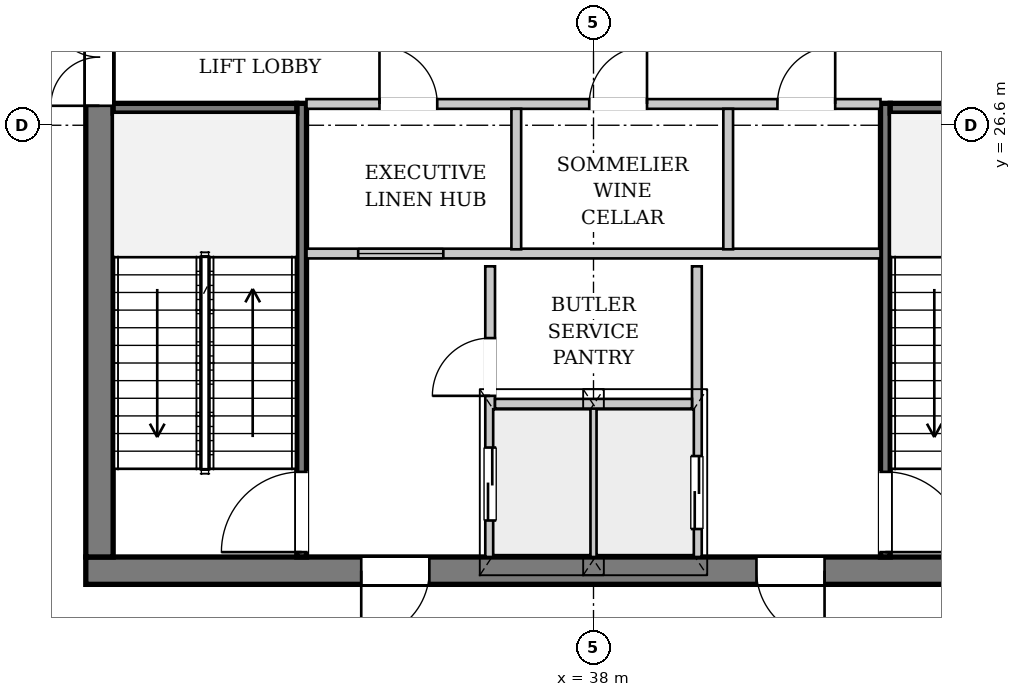
"""IFC4 building model, lengths in metres.
Left out: names, types, materials, properties, quantities, classifications, styles, units other than length and angle.
Written with IfcOpenShell. Run it as: python <this file> out.ifc"""

import sys

from ifc_helpers import new_model, si_unit, direction, frame, frame_2d, origin, place, context, subcontext, project, spatial, rectangle, extrude, source, transform, mapped, element, fill, save


model = new_model("IFC4")
c1 = context("Model", 3, precision=1e-05, world=origin(), true_north=direction((0.0, 1.0)))
c2 = subcontext(c1, "Body", "Model", "MODEL_VIEW")
j1 = project(units=[si_unit("LENGTHUNIT", "METRE"), si_unit("PLANEANGLEUNIT", "RADIAN")], contexts=[c1])
p1 = place(None, origin())
s1 = spatial("IfcSite", under=j1, at=p1, CompositionType="ELEMENT")
p2 = place(p1, origin())
s2 = spatial("IfcBuilding", under=s1, at=p2, CompositionType="ELEMENT")
p3 = place(p2, frame((0.0, 0.0, 286.1)))
s3 = spatial("IfcBuildingStorey", under=s2, at=p3, CompositionType="ELEMENT", Elevation=286.1)
p4 = place(p3, frame((30.61, 12.974, 0.0), z_axis=(0.0, 0.0, 1.0), x_axis=(-0.818470582771, 0.57454843585, 0.0)))
e1 = element("IfcWall", 1, at=p4, inside=s3, PredefinedType="SOLIDWALL", context=c2, shape_type="SweptSolid", body=[
    extrude(rectangle(XDim=17.145, YDim=0.32, at=frame_2d((8.573, 0.0))), origin(), (0.0, 0.0, 1.0), 3.662),
])
p5 = place(p4, frame((4.737, 0.0, 0.0)))
e2 = element("IfcOpeningElement", 2, at=p5, cuts=e1, PredefinedType="OPENING", context=c2, shape_type="SweptSolid", body=[
    extrude(rectangle(XDim=1.5, YDim=2.3, at=frame_2d((0.75, 1.15))), frame((0.0, 0.17, 0.0), z_axis=(0.0, -1.0, 0.0), x_axis=(1.0, 0.0, 0.0)), (0.0, 0.0, 1.0), 0.34),
])
p6 = place(p4, frame((11.388, 0.0, 0.65)))
e3 = element("IfcOpeningElement", 3, at=p6, cuts=e1, PredefinedType="OPENING", context=c2, shape_type="SweptSolid", body=[
    extrude(rectangle(XDim=2.6, YDim=2.35, at=frame_2d((1.3, 1.175))), frame((0.0, 0.17, 0.0), z_axis=(0.0, -1.0, 0.0), x_axis=(1.0, 0.0, 0.0)), (0.0, 0.0, 1.0), 0.34),
])
p7 = place(p3, frame((46.35, 19.275, 0.0), z_axis=(0.0, 0.0, 1.0), x_axis=(-1.0, 0.0, 0.0)))
e4 = element("IfcWall", 4, at=p7, inside=s3, PredefinedType="SHEAR", context=c2, shape_type="SweptSolid", body=[
    extrude(rectangle(XDim=16.7, YDim=0.45, at=frame_2d((8.35, 0.0))), origin(), (0.0, 0.0, 1.0), 4.12),
])
p8 = place(p7, frame((4.55, 0.0, 0.0)))
e5 = element("IfcOpeningElement", 5, at=p8, cuts=e4, PredefinedType="OPENING", context=c2, shape_type="SweptSolid", body=[
    extrude(rectangle(XDim=1.12, YDim=2.25, at=frame_2d((0.56, 1.125))), frame((0.0, 0.235, 0.0), z_axis=(0.0, -1.0, 0.0), x_axis=(1.0, 0.0, 0.0)), (0.0, 0.0, 1.0), 0.47),
])
p9 = place(p7, frame((11.05, 0.0, 0.0)))
e6 = element("IfcOpeningElement", 6, at=p9, cuts=e4, PredefinedType="OPENING", context=c2, shape_type="SweptSolid", body=[
    extrude(rectangle(XDim=1.12, YDim=2.25, at=frame_2d((0.56, 1.125))), frame((0.0, 0.235, 0.0), z_axis=(0.0, -1.0, 0.0), x_axis=(1.0, 0.0, 0.0)), (0.0, 0.0, 1.0), 0.47),
])
p10 = place(p3, frame((29.875, 19.5, 0.0), z_axis=(0.0, 0.0, 1.0), x_axis=(0.0, 1.0, 0.0)))
e7 = element("IfcWall", 7, at=p10, inside=s3, PredefinedType="SHEAR", context=c2, shape_type="SweptSolid", body=[
    extrude(rectangle(XDim=14.2, YDim=0.45, at=frame_2d((7.1, 0.0))), origin(), (0.0, 0.0, 1.0), 4.12),
])
p11 = place(p10, frame((7.42, 0.0, 0.0)))
e8 = element("IfcOpeningElement", 8, at=p11, cuts=e7, PredefinedType="OPENING", context=c2, shape_type="SweptSolid", body=[
    extrude(rectangle(XDim=1.6, YDim=2.2, at=frame_2d((0.8, 1.1))), frame((0.0, 0.235, 0.0), z_axis=(0.0, -1.0, 0.0), x_axis=(1.0, 0.0, 0.0)), (0.0, 0.0, 1.0), 0.47),
])
p12 = place(p3, frame((33.2, 19.5, 0.0), z_axis=(0.0, 0.0, 1.0), x_axis=(0.0, 1.0, 0.0)))
e9 = element("IfcWall", 9, at=p12, inside=s3, PredefinedType="PARTITIONING", context=c2, shape_type="SweptSolid", body=[
    extrude(rectangle(XDim=7.46, YDim=0.16, at=frame_2d((3.73, 0.0))), origin(), (0.0, 0.0, 1.0), 4.12),
])
p13 = place(p12, frame((0.08, 0.0, 0.0)))
e10 = element("IfcOpeningElement", 10, at=p13, cuts=e9, PredefinedType="OPENING", context=c2, shape_type="SweptSolid", body=[
    extrude(rectangle(XDim=1.32, YDim=2.2, at=frame_2d((0.66, 1.1))), frame((0.0, 0.09, 0.0), z_axis=(0.0, -1.0, 0.0), x_axis=(1.0, 0.0, 0.0)), (0.0, 0.0, 1.0), 0.18),
])
p14 = place(p3, frame((30.1, 26.88, 0.0), z_axis=(0.0, 0.0, 1.0), x_axis=(1.0, 0.0, 0.0)))
e11 = element("IfcWall", 11, at=p14, inside=s3, PredefinedType="PARTITIONING", context=c2, shape_type="SweptSolid", body=[
    extrude(rectangle(XDim=3.02, YDim=0.16, at=frame_2d((1.51, 0.0))), origin(), (0.0, 0.0, 1.0), 4.12),
])
p15 = place(p3, frame((42.8, 26.96, 0.0), z_axis=(0.0, 0.0, 1.0), x_axis=(0.0, -1.0, 0.0)))
e12 = element("IfcWall", 12, at=p15, inside=s3, PredefinedType="PARTITIONING", context=c2, shape_type="SweptSolid", body=[
    extrude(rectangle(XDim=7.46, YDim=0.16, at=frame_2d((3.73, 0.0))), origin(), (0.0, 0.0, 1.0), 4.12),
])
p16 = place(p15, frame((6.06, 0.0, 0.0)))
e13 = element("IfcOpeningElement", 13, at=p16, cuts=e12, PredefinedType="OPENING", context=c2, shape_type="SweptSolid", body=[
    extrude(rectangle(XDim=1.32, YDim=2.2, at=frame_2d((0.66, 1.1))), frame((0.0, 0.09, 0.0), z_axis=(0.0, -1.0, 0.0), x_axis=(1.0, 0.0, 0.0)), (0.0, 0.0, 1.0), 0.18),
])
p17 = place(p3, frame((42.88, 26.88, 0.0), z_axis=(0.0, 0.0, 1.0), x_axis=(1.0, 0.0, 0.0)))
e14 = element("IfcWall", 14, at=p17, inside=s3, PredefinedType="PARTITIONING", context=c2, shape_type="SweptSolid", body=[
    extrude(rectangle(XDim=3.02, YDim=0.16, at=frame_2d((1.51, 0.0))), origin(), (0.0, 0.0, 1.0), 4.12),
])
p18 = place(p3, frame((36.3, 19.5, 0.0), z_axis=(0.0, 0.0, 1.0), x_axis=(0.0, 1.0, 0.0)))
e15 = element("IfcWall", 15, at=p18, inside=s3, PredefinedType="PARTITIONING", context=c2, shape_type="SweptSolid", body=[
    extrude(rectangle(XDim=4.78, YDim=0.16, at=frame_2d((2.39, 0.0))), origin(), (0.0, 0.0, 1.0), 4.12),
])
p19 = place(p18, frame((0.6, 0.0, 0.0)))
e16 = element("IfcOpeningElement", 16, at=p19, cuts=e15, PredefinedType="OPENING", context=c2, shape_type="SweptSolid", body=[
    extrude(rectangle(XDim=1.2, YDim=2.2, at=frame_2d((0.6, 1.1))), frame((0.0, 0.09, 0.0), z_axis=(0.0, -1.0, 0.0), x_axis=(1.0, 0.0, 0.0)), (0.0, 0.0, 1.0), 0.18),
])
p20 = place(p18, frame((2.65, 0.0, 0.0)))
e17 = element("IfcOpeningElement", 17, at=p20, cuts=e15, PredefinedType="OPENING", context=c2, shape_type="SweptSolid", body=[
    extrude(rectangle(XDim=0.95, YDim=2.1, at=frame_2d((0.475, 1.05))), frame((0.0, 0.09, 0.0), z_axis=(0.0, -1.0, 0.0), x_axis=(1.0, 0.0, 0.0)), (0.0, 0.0, 1.0), 0.18),
])
p21 = place(p3, frame((39.7, 24.28, 0.0), z_axis=(0.0, 0.0, 1.0), x_axis=(0.0, -1.0, 0.0)))
e18 = element("IfcWall", 18, at=p21, inside=s3, PredefinedType="PARTITIONING", context=c2, shape_type="SweptSolid", body=[
    extrude(rectangle(XDim=4.78, YDim=0.16, at=frame_2d((2.39, 0.0))), origin(), (0.0, 0.0, 1.0), 4.12),
])
p22 = place(p21, frame((3.12, 0.0, 0.0)))
e19 = element("IfcOpeningElement", 19, at=p22, cuts=e18, PredefinedType="OPENING", context=c2, shape_type="SweptSolid", body=[
    extrude(rectangle(XDim=1.2, YDim=2.2, at=frame_2d((0.6, 1.1))), frame((0.0, 0.09, 0.0), z_axis=(0.0, -1.0, 0.0), x_axis=(1.0, 0.0, 0.0)), (0.0, 0.0, 1.0), 0.18),
])
p23 = place(p3, frame((38.0, 19.5, 0.0), z_axis=(0.0, 0.0, 1.0), x_axis=(0.0, 1.0, 0.0)))
e20 = element("IfcWall", 20, at=p23, inside=s3, PredefinedType="PARTITIONING", context=c2, shape_type="SweptSolid", body=[
    extrude(rectangle(XDim=2.46, YDim=0.125, at=frame_2d((1.23, 0.0))), origin(), (0.0, 0.0, 1.0), 4.12),
])
p24 = place(p3, frame((36.38, 22.02, 0.0), z_axis=(0.0, 0.0, 1.0), x_axis=(1.0, 0.0, 0.0)))
e21 = element("IfcWall", 21, at=p24, inside=s3, PredefinedType="PARTITIONING", context=c2, shape_type="SweptSolid", body=[
    extrude(rectangle(XDim=3.24, YDim=0.16, at=frame_2d((1.62, 0.0))), origin(), (0.0, 0.0, 1.0), 4.12),
])
p25 = place(p3, frame((33.28, 24.49, 0.0), z_axis=(0.0, 0.0, 1.0), x_axis=(1.0, 0.0, 0.0)))
e22 = element("IfcWall", 22, at=p25, inside=s3, PredefinedType="PARTITIONING", context=c2, shape_type="SweptSolid", body=[
    extrude(rectangle(XDim=9.44, YDim=0.16, at=frame_2d((4.72, 0.0))), origin(), (0.0, 0.0, 1.0), 4.12),
])
p26 = place(p25, frame((0.85, 0.0, 0.95)))
e23 = element("IfcOpeningElement", 23, at=p26, cuts=e22, PredefinedType="OPENING", context=c2, shape_type="SweptSolid", body=[
    extrude(rectangle(XDim=1.4, YDim=1.8, at=frame_2d((0.7, 0.9))), frame((0.0, 0.09, 0.0), z_axis=(0.0, -1.0, 0.0), x_axis=(1.0, 0.0, 0.0)), (0.0, 0.0, 1.0), 0.18),
])
p27 = place(p3, frame((33.28, 26.95, 0.0), z_axis=(0.0, 0.0, 1.0), x_axis=(1.0, 0.0, 0.0)))
e24 = element("IfcWall", 24, at=p27, inside=s3, PredefinedType="PARTITIONING", context=c2, shape_type="SweptSolid", body=[
    extrude(rectangle(XDim=9.44, YDim=0.16, at=frame_2d((4.72, 0.0))), origin(), (0.0, 0.0, 1.0), 4.12),
])
p28 = place(p27, frame((1.2, 0.0, 0.0)))
e25 = element("IfcOpeningElement", 25, at=p28, cuts=e24, PredefinedType="OPENING", context=c2, shape_type="SweptSolid", body=[
    extrude(rectangle(XDim=0.95, YDim=2.1, at=frame_2d((0.475, 1.05))), frame((0.0, 0.09, 0.0), z_axis=(0.0, -1.0, 0.0), x_axis=(1.0, 0.0, 0.0)), (0.0, 0.0, 1.0), 0.18),
])
p29 = place(p27, frame((4.65, 0.0, 0.0)))
e26 = element("IfcOpeningElement", 26, at=p29, cuts=e24, PredefinedType="OPENING", context=c2, shape_type="SweptSolid", body=[
    extrude(rectangle(XDim=0.95, YDim=2.1, at=frame_2d((0.475, 1.05))), frame((0.0, 0.09, 0.0), z_axis=(0.0, -1.0, 0.0), x_axis=(1.0, 0.0, 0.0)), (0.0, 0.0, 1.0), 0.18),
])
p30 = place(p27, frame((7.745, 0.0, 0.0)))
e27 = element("IfcOpeningElement", 27, at=p30, cuts=e24, PredefinedType="OPENING", context=c2, shape_type="SweptSolid", body=[
    extrude(rectangle(XDim=0.95, YDim=2.1, at=frame_2d((0.475, 1.05))), frame((0.0, 0.09, 0.0), z_axis=(0.0, -1.0, 0.0), x_axis=(1.0, 0.0, 0.0)), (0.0, 0.0, 1.0), 0.18),
])
for number, where, z_axis, x_axis in (
    (28, (36.73, 24.56, 0.0), (0.0, 0.0, 1.0), (0.0, 1.0, 0.0)),
    (29, (40.215, 24.56, 0.0), (0.0, 0.0, 1.0), (0.0, 1.0, 0.0)),
):
    element("IfcWall", number, at=place(p3, frame(where, z_axis=z_axis, x_axis=x_axis)), inside=s3, PredefinedType="PARTITIONING", context=c2, shape_type="SweptSolid", body=[
        extrude(rectangle(XDim=2.31, YDim=0.16, at=frame_2d((1.155, 0.0))), origin(), (0.0, 0.0, 1.0), 4.12),
    ])
m1 = source(origin(), c2, "Body", "SweptSolid", [
    extrude(rectangle(XDim=1.12, YDim=2.25, at=frame_2d((0.56, 1.125))), frame((0.0, 0.025, 0.0), z_axis=(0.0, -1.0, 0.0), x_axis=(1.0, 0.0, 0.0)), (0.0, 0.0, 1.0), 0.05),
])
p31 = place(p8, origin())
e30 = element("IfcDoor", 30, at=p31, inside=s3, OperationType="SINGLE_SWING_LEFT", PredefinedType="DOOR", context=c2, shape_type="MappedRepresentation", body=[
    mapped(m1, transform((0.0, 0.0, 0.0), x_axis=(1.0, 0.0, 0.0), y_axis=(0.0, 1.0, 0.0), z_axis=(0.0, 0.0, 1.0), scale=1.0)),
])
fill(e5, e30)
p32 = place(p9, origin())
e31 = element("IfcDoor", 31, at=p32, inside=s3, OperationType="SINGLE_SWING_RIGHT", PredefinedType="DOOR", context=c2, shape_type="MappedRepresentation", body=[
    mapped(m1, transform((0.0, 0.0, 0.0), x_axis=(1.0, 0.0, 0.0), y_axis=(0.0, 1.0, 0.0), z_axis=(0.0, 0.0, 1.0), scale=1.0)),
])
fill(e6, e31)
m2 = source(origin(), c2, "Body", "SweptSolid", [
    extrude(rectangle(XDim=1.6, YDim=2.2, at=frame_2d((0.8, 1.1))), frame((0.0, 0.025, 0.0), z_axis=(0.0, -1.0, 0.0), x_axis=(1.0, 0.0, 0.0)), (0.0, 0.0, 1.0), 0.05),
])
p33 = place(p11, origin())
e32 = element("IfcDoor", 32, at=p33, inside=s3, OperationType="DOUBLE_DOOR_SINGLE_SWING", PredefinedType="DOOR", context=c2, shape_type="MappedRepresentation", body=[
    mapped(m2, transform((0.0, 0.0, 0.0), x_axis=(1.0, 0.0, 0.0), y_axis=(0.0, 1.0, 0.0), z_axis=(0.0, 0.0, 1.0), scale=1.0)),
])
fill(e8, e32)
m3 = source(origin(), c2, "Body", "SweptSolid", [
    extrude(rectangle(XDim=1.32, YDim=2.2, at=frame_2d((0.66, 1.1))), frame((0.0, 0.025, 0.0), z_axis=(0.0, -1.0, 0.0), x_axis=(1.0, 0.0, 0.0)), (0.0, 0.0, 1.0), 0.05),
])
p34 = place(p13, origin())
e33 = element("IfcDoor", 33, at=p34, inside=s3, OperationType="SINGLE_SWING_LEFT", PredefinedType="DOOR", context=c2, shape_type="MappedRepresentation", body=[
    mapped(m3, transform((0.0, 0.0, 0.0), x_axis=(1.0, 0.0, 0.0), y_axis=(0.0, 1.0, 0.0), z_axis=(0.0, 0.0, 1.0), scale=1.0)),
])
fill(e10, e33)
p35 = place(p16, origin())
e34 = element("IfcDoor", 34, at=p35, inside=s3, OperationType="SINGLE_SWING_RIGHT", PredefinedType="DOOR", context=c2, shape_type="MappedRepresentation", body=[
    mapped(m3, transform((0.0, 0.0, 0.0), x_axis=(1.0, 0.0, 0.0), y_axis=(0.0, 1.0, 0.0), z_axis=(0.0, 0.0, 1.0), scale=1.0)),
])
fill(e13, e34)
m4 = source(origin(), c2, "Body", "SweptSolid", [
    extrude(rectangle(XDim=1.2, YDim=2.2, at=frame_2d((0.6, 1.1))), frame((0.0, 0.025, 0.0), z_axis=(0.0, -1.0, 0.0), x_axis=(1.0, 0.0, 0.0)), (0.0, 0.0, 1.0), 0.05),
])
p36 = place(p19, origin())
e35 = element("IfcDoor", 35, at=p36, inside=s3, OperationType="DOUBLE_DOOR_SLIDING", PredefinedType="DOOR", context=c2, shape_type="MappedRepresentation", body=[
    mapped(m4, transform((0.0, 0.0, 0.0), x_axis=(1.0, 0.0, 0.0), y_axis=(0.0, 1.0, 0.0), z_axis=(0.0, 0.0, 1.0), scale=1.0)),
])
fill(e16, e35)
m5 = source(origin(), c2, "Body", "SweptSolid", [
    extrude(rectangle(XDim=0.95, YDim=2.1, at=frame_2d((0.475, 1.05))), frame((0.0, 0.025, 0.0), z_axis=(0.0, -1.0, 0.0), x_axis=(1.0, 0.0, 0.0)), (0.0, 0.0, 1.0), 0.05),
])
p37 = place(p20, origin())
e36 = element("IfcDoor", 36, at=p37, inside=s3, OperationType="SINGLE_SWING_LEFT", PredefinedType="DOOR", context=c2, shape_type="MappedRepresentation", body=[
    mapped(m5, transform((0.0, 0.0, 0.0), x_axis=(1.0, 0.0, 0.0), y_axis=(0.0, 1.0, 0.0), z_axis=(0.0, 0.0, 1.0), scale=1.0)),
])
fill(e17, e36)
p38 = place(p22, origin())
e37 = element("IfcDoor", 37, at=p38, inside=s3, OperationType="DOUBLE_DOOR_SLIDING", PredefinedType="DOOR", context=c2, shape_type="MappedRepresentation", body=[
    mapped(m4, transform((0.0, 0.0, 0.0), x_axis=(1.0, 0.0, 0.0), y_axis=(0.0, 1.0, 0.0), z_axis=(0.0, 0.0, 1.0), scale=1.0)),
])
fill(e19, e37)
p39 = place(p28, origin())
e38 = element("IfcDoor", 38, at=p39, inside=s3, OperationType="SINGLE_SWING_LEFT", PredefinedType="DOOR", context=c2, shape_type="MappedRepresentation", body=[
    mapped(m5, transform((0.0, 0.0, 0.0), x_axis=(1.0, 0.0, 0.0), y_axis=(0.0, 1.0, 0.0), z_axis=(0.0, 0.0, 1.0), scale=1.0)),
])
fill(e25, e38)
p40 = place(p29, origin())
e39 = element("IfcDoor", 39, at=p40, inside=s3, OperationType="SINGLE_SWING_RIGHT", PredefinedType="DOOR", context=c2, shape_type="MappedRepresentation", body=[
    mapped(m5, transform((0.0, 0.0, 0.0), x_axis=(1.0, 0.0, 0.0), y_axis=(0.0, 1.0, 0.0), z_axis=(0.0, 0.0, 1.0), scale=1.0)),
])
fill(e26, e39)
p41 = place(p30, origin())
e40 = element("IfcDoor", 40, at=p41, inside=s3, OperationType="SINGLE_SWING_RIGHT", PredefinedType="DOOR", context=c2, shape_type="MappedRepresentation", body=[
    mapped(m5, transform((0.0, 0.0, 0.0), x_axis=(1.0, 0.0, 0.0), y_axis=(0.0, 1.0, 0.0), z_axis=(0.0, 0.0, 1.0), scale=1.0)),
])
fill(e27, e40)
m6 = source(origin(), c2, "Body", "SweptSolid", [
    extrude(rectangle(XDim=1.4, YDim=1.8, at=frame_2d((0.7, 0.9))), frame((0.0, 0.03, 0.0), z_axis=(0.0, -1.0, 0.0), x_axis=(1.0, 0.0, 0.0)), (0.0, 0.0, 1.0), 0.06),
])
p42 = place(p26, origin())
e41 = element("IfcWindow", 41, at=p42, inside=s3, PartitioningType="SINGLE_PANEL", PredefinedType="WINDOW", context=c2, shape_type="MappedRepresentation", body=[
    mapped(m6, transform((0.0, 0.0, 0.0), x_axis=(1.0, 0.0, 0.0), y_axis=(0.0, 1.0, 0.0), z_axis=(0.0, 0.0, 1.0), scale=1.0)),
])
fill(e23, e41)
save(model, sys.argv[1])
